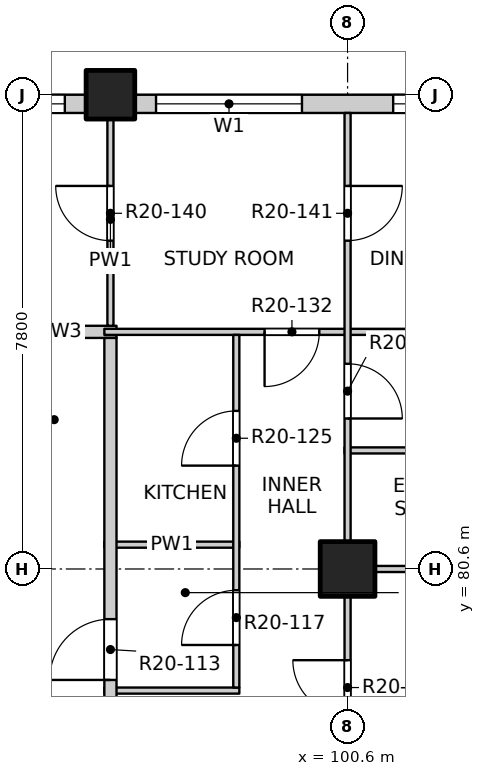
"""IFC4 building model, lengths in metres.
Left out: names, types, materials, properties, quantities, classifications, styles, units other than length and angle.
Written with IfcOpenShell. Run it as: python <this file> out.ifc"""

import sys

from ifc_helpers import new_model, si_unit, direction, frame, frame_2d, origin, origin_2d, place, context, subcontext, project, spatial, rectangle, extrude, element, fill, save


model = new_model("IFC4")
c1 = context("Model", 3, precision=1e-05, world=origin(), true_north=direction((0.0, 1.0)))
c2 = subcontext(c1, "Body", "Model", "MODEL_VIEW")
j1 = project(units=[si_unit("LENGTHUNIT", "METRE"), si_unit("PLANEANGLEUNIT", "RADIAN")], contexts=[c1])
p1 = place(None, origin())
s1 = spatial("IfcSite", under=j1, at=p1, CompositionType="ELEMENT")
p2 = place(p1, origin())
s2 = spatial("IfcBuilding", under=s1, at=p2, CompositionType="ELEMENT")
p3 = place(p2, frame((0.0, 0.0, 204.1)))
s3 = spatial("IfcBuildingStorey", under=s2, at=p3, CompositionType="ELEMENT", Elevation=204.1)
p4 = place(p3, frame((96.7, 88.4, -0.25), z_axis=(0.0, 0.0, 1.0), x_axis=(1.0, 0.0, 0.0)))
e1 = element("IfcColumn", 1, at=p4, inside=s3, PredefinedType="COLUMN", context=c2, shape_type="SweptSolid", body=[
    extrude(rectangle(XDim=0.8, YDim=0.8, at=origin_2d()), origin(), (0.0, 0.0, 1.0), 3.4),
])
p5 = place(p3, frame((100.6, 80.6, -0.25), z_axis=(0.0, 0.0, 1.0), x_axis=(1.0, 0.0, 0.0)))
e2 = element("IfcColumn", 2, at=p5, inside=s3, PredefinedType="COLUMN", context=c2, shape_type="SweptSolid", body=[
    extrude(rectangle(XDim=0.9, YDim=0.9, at=origin_2d()), origin(), (0.0, 0.0, 1.0), 3.4),
])
p6 = place(p3, frame((73.7, 88.25, 0.0), z_axis=(0.0, 0.0, 1.0), x_axis=(1.0, 0.0, 0.0)))
e3 = element("IfcWall", 3, at=p6, inside=s3, PredefinedType="SOLIDWALL", context=c2, shape_type="SweptSolid", body=[
    extrude(rectangle(XDim=22.6, YDim=0.3, at=frame_2d((11.3, 0.0))), origin(), (0.0, 0.0, 1.0), 2.7),
])
p7 = place(p6, frame((0.35, 0.0, 0.9)))
e4 = element("IfcOpeningElement", 4, at=p7, cuts=e3, PredefinedType="OPENING", context=c2, shape_type="SweptSolid", body=[
    extrude(rectangle(XDim=2.4, YDim=1.8, at=frame_2d((1.2, 0.9))), frame((0.0, 0.16, 0.0), z_axis=(0.0, -1.0, 0.0), x_axis=(1.0, 0.0, 0.0)), (0.0, 0.0, 1.0), 0.32),
])
p8 = place(p6, frame((4.25, 0.0, 0.9)))
e5 = element("IfcOpeningElement", 5, at=p8, cuts=e3, PredefinedType="OPENING", context=c2, shape_type="SweptSolid", body=[
    extrude(rectangle(XDim=2.4, YDim=1.8, at=frame_2d((1.2, 0.9))), frame((0.0, 0.16, 0.0), z_axis=(0.0, -1.0, 0.0), x_axis=(1.0, 0.0, 0.0)), (0.0, 0.0, 1.0), 0.32),
])
p9 = place(p6, frame((8.15, 0.0, 0.9)))
e6 = element("IfcOpeningElement", 6, at=p9, cuts=e3, PredefinedType="OPENING", context=c2, shape_type="SweptSolid", body=[
    extrude(rectangle(XDim=2.4, YDim=1.8, at=frame_2d((1.2, 0.9))), frame((0.0, 0.16, 0.0), z_axis=(0.0, -1.0, 0.0), x_axis=(1.0, 0.0, 0.0)), (0.0, 0.0, 1.0), 0.32),
])
p10 = place(p6, frame((12.05, 0.0, 0.9)))
e7 = element("IfcOpeningElement", 7, at=p10, cuts=e3, PredefinedType="OPENING", context=c2, shape_type="SweptSolid", body=[
    extrude(rectangle(XDim=2.4, YDim=1.8, at=frame_2d((1.2, 0.9))), frame((0.0, 0.16, 0.0), z_axis=(0.0, -1.0, 0.0), x_axis=(1.0, 0.0, 0.0)), (0.0, 0.0, 1.0), 0.32),
])
p11 = place(p6, frame((15.95, 0.0, 0.9)))
e8 = element("IfcOpeningElement", 8, at=p11, cuts=e3, PredefinedType="OPENING", context=c2, shape_type="SweptSolid", body=[
    extrude(rectangle(XDim=2.4, YDim=1.8, at=frame_2d((1.2, 0.9))), frame((0.0, 0.16, 0.0), z_axis=(0.0, -1.0, 0.0), x_axis=(1.0, 0.0, 0.0)), (0.0, 0.0, 1.0), 0.32),
])
p12 = place(p6, frame((19.85, 0.0, 0.9)))
e9 = element("IfcOpeningElement", 9, at=p12, cuts=e3, PredefinedType="OPENING", context=c2, shape_type="SweptSolid", body=[
    extrude(rectangle(XDim=2.4, YDim=1.8, at=frame_2d((1.2, 0.9))), frame((0.0, 0.16, 0.0), z_axis=(0.0, -1.0, 0.0), x_axis=(1.0, 0.0, 0.0)), (0.0, 0.0, 1.0), 0.32),
])
p13 = place(p3, frame((97.1, 88.25, 0.0), z_axis=(0.0, 0.0, 1.0), x_axis=(1.0, 0.0, 0.0)))
e10 = element("IfcWall", 10, at=p13, inside=s3, PredefinedType="SOLIDWALL", context=c2, shape_type="SweptSolid", body=[
    extrude(rectangle(XDim=7.4, YDim=0.3, at=frame_2d((3.7, 0.0))), origin(), (0.0, 0.0, 1.0), 2.7),
])
p14 = place(p13, frame((0.35, 0.0, 0.9)))
e11 = element("IfcOpeningElement", 11, at=p14, cuts=e10, PredefinedType="OPENING", context=c2, shape_type="SweptSolid", body=[
    extrude(rectangle(XDim=2.4, YDim=1.8, at=frame_2d((1.2, 0.9))), frame((0.0, 0.16, 0.0), z_axis=(0.0, -1.0, 0.0), x_axis=(1.0, 0.0, 0.0)), (0.0, 0.0, 1.0), 0.32),
])
p15 = place(p13, frame((4.25, 0.0, 0.9)))
e12 = element("IfcOpeningElement", 12, at=p15, cuts=e10, PredefinedType="OPENING", context=c2, shape_type="SweptSolid", body=[
    extrude(rectangle(XDim=2.4, YDim=1.8, at=frame_2d((1.2, 0.9))), frame((0.0, 0.16, 0.0), z_axis=(0.0, -1.0, 0.0), x_axis=(1.0, 0.0, 0.0)), (0.0, 0.0, 1.0), 0.32),
])
p16 = place(p3, frame((96.6, 78.6, 0.0), z_axis=(0.0, 0.0, 1.0), x_axis=(1.0, 0.0, 0.0)))
e13 = element("IfcWall", 13, at=p16, inside=s3, PredefinedType="PARTITIONING", context=c2, shape_type="SweptSolid", body=[
    extrude(rectangle(XDim=2.22, YDim=0.1, at=frame_2d((1.11, 0.0))), origin(), (0.0, 0.0, 1.0), 3.15),
])
p17 = place(p3, frame((100.55, 80.6, 0.0), z_axis=(0.0, 0.0, 1.0), x_axis=(1.0, 0.0, 0.0)))
e14 = element("IfcWall", 14, at=p17, inside=s3, PredefinedType="PARTITIONING", context=c2, shape_type="SweptSolid", body=[
    extrude(rectangle(XDim=7.55, YDim=0.1, at=frame_2d((3.775, 0.0))), origin(), (0.0, 0.0, 1.0), 3.15),
])
p18 = place(p3, frame((96.6, 81.0, 0.0), z_axis=(0.0, 0.0, 1.0), x_axis=(1.0, 0.0, 0.0)))
e15 = element("IfcWall", 15, at=p18, inside=s3, PredefinedType="PARTITIONING", context=c2, shape_type="SweptSolid", body=[
    extrude(rectangle(XDim=2.22, YDim=0.1, at=frame_2d((1.11, 0.0))), origin(), (0.0, 0.0, 1.0), 3.15),
])
p19 = place(p3, frame((100.55, 82.55, 0.0), z_axis=(0.0, 0.0, 1.0), x_axis=(1.0, 0.0, 0.0)))
e16 = element("IfcWall", 16, at=p19, inside=s3, PredefinedType="PARTITIONING", context=c2, shape_type="SweptSolid", body=[
    extrude(rectangle(XDim=3.7, YDim=0.1, at=frame_2d((1.85, 0.0))), origin(), (0.0, 0.0, 1.0), 3.15),
])
p20 = place(p3, frame((94.95, 84.5, 0.0), z_axis=(0.0, 0.0, 1.0), x_axis=(1.0, 0.0, 0.0)))
e17 = element("IfcWall", 17, at=p20, inside=s3, PredefinedType="PARTITIONING", context=c2, shape_type="SweptSolid", body=[
    extrude(rectangle(XDim=1.85, YDim=0.2, at=frame_2d((0.925, 0.0))), origin(), (0.0, 0.0, 1.0), 3.15),
])
p21 = place(p3, frame((96.6, 84.5, 0.0), z_axis=(0.0, 0.0, 1.0), x_axis=(1.0, 0.0, 0.0)))
e18 = element("IfcWall", 18, at=p21, inside=s3, PredefinedType="PARTITIONING", context=c2, shape_type="SweptSolid", body=[
    extrude(rectangle(XDim=11.5, YDim=0.1, at=frame_2d((5.75, 0.0))), origin(), (0.0, 0.0, 1.0), 3.15),
])
p22 = place(p21, frame((2.635, 0.0, 0.0)))
e19 = element("IfcOpeningElement", 19, at=p22, cuts=e18, PredefinedType="OPENING", context=c2, shape_type="SweptSolid", body=[
    extrude(rectangle(XDim=0.9, YDim=2.1, at=frame_2d((0.45, 1.05))), frame((0.0, 0.06, 0.0), z_axis=(0.0, -1.0, 0.0), x_axis=(1.0, 0.0, 0.0)), (0.0, 0.0, 1.0), 0.12),
])
p23 = place(p3, frame((96.7, 49.5, 0.0), z_axis=(0.0, 0.0, 1.0), x_axis=(0.0, 1.0, 0.0)))
e20 = element("IfcWall", 20, at=p23, inside=s3, PredefinedType="PARTITIONING", context=c2, shape_type="SweptSolid", body=[
    extrude(rectangle(XDim=34.9, YDim=0.2, at=frame_2d((17.45, 0.0))), origin(), (0.0, 0.0, 1.0), 3.15),
])
p24 = place(p23, frame((9.625, 0.0, 0.0)))
e21 = element("IfcOpeningElement", 21, at=p24, cuts=e20, PredefinedType="OPENING", context=c2, shape_type="SweptSolid", body=[
    extrude(rectangle(XDim=1.0, YDim=2.1, at=frame_2d((0.5, 1.05))), frame((0.0, 0.11, 0.0), z_axis=(0.0, -1.0, 0.0), x_axis=(1.0, 0.0, 0.0)), (0.0, 0.0, 1.0), 0.22),
])
p25 = place(p23, frame((14.125, 0.0, 0.0)))
e22 = element("IfcOpeningElement", 22, at=p25, cuts=e20, PredefinedType="OPENING", context=c2, shape_type="SweptSolid", body=[
    extrude(rectangle(XDim=1.0, YDim=2.1, at=frame_2d((0.5, 1.05))), frame((0.0, 0.11, 0.0), z_axis=(0.0, -1.0, 0.0), x_axis=(1.0, 0.0, 0.0)), (0.0, 0.0, 1.0), 0.22),
])
p26 = place(p23, frame((29.275, 0.0, 0.0)))
e23 = element("IfcOpeningElement", 23, at=p26, cuts=e20, PredefinedType="OPENING", context=c2, shape_type="SweptSolid", body=[
    extrude(rectangle(XDim=1.0, YDim=2.1, at=frame_2d((0.5, 1.05))), frame((0.0, 0.11, 0.0), z_axis=(0.0, -1.0, 0.0), x_axis=(1.0, 0.0, 0.0)), (0.0, 0.0, 1.0), 0.22),
])
p27 = place(p3, frame((96.7, 84.6, 0.0), z_axis=(0.0, 0.0, 1.0), x_axis=(0.0, 1.0, 0.0)))
e24 = element("IfcWall", 24, at=p27, inside=s3, PredefinedType="PARTITIONING", context=c2, shape_type="SweptSolid", body=[
    extrude(rectangle(XDim=3.5, YDim=0.1, at=frame_2d((1.75, 0.0))), origin(), (0.0, 0.0, 1.0), 3.15),
])
p28 = place(p27, frame((1.4, 0.0, 0.0)))
e25 = element("IfcOpeningElement", 25, at=p28, cuts=e24, PredefinedType="OPENING", context=c2, shape_type="SweptSolid", body=[
    extrude(rectangle(XDim=0.9, YDim=2.1, at=frame_2d((0.45, 1.05))), frame((0.0, 0.06, 0.0), z_axis=(0.0, -1.0, 0.0), x_axis=(1.0, 0.0, 0.0)), (0.0, 0.0, 1.0), 0.12),
])
p29 = place(p3, frame((98.77, 78.65, 0.0), z_axis=(0.0, 0.0, 1.0), x_axis=(0.0, 1.0, 0.0)))
e26 = element("IfcWall", 26, at=p29, inside=s3, PredefinedType="PARTITIONING", context=c2, shape_type="SweptSolid", body=[
    extrude(rectangle(XDim=5.8, YDim=0.1, at=frame_2d((2.9, 0.0))), origin(), (0.0, 0.0, 1.0), 3.15),
])
p30 = place(p29, frame((0.7, 0.0, 0.0)))
e27 = element("IfcOpeningElement", 27, at=p30, cuts=e26, PredefinedType="OPENING", context=c2, shape_type="SweptSolid", body=[
    extrude(rectangle(XDim=0.9, YDim=2.1, at=frame_2d((0.45, 1.05))), frame((0.0, 0.06, 0.0), z_axis=(0.0, -1.0, 0.0), x_axis=(1.0, 0.0, 0.0)), (0.0, 0.0, 1.0), 0.12),
])
p31 = place(p29, frame((3.65, 0.0, 0.0)))
e28 = element("IfcOpeningElement", 28, at=p31, cuts=e26, PredefinedType="OPENING", context=c2, shape_type="SweptSolid", body=[
    extrude(rectangle(XDim=0.9, YDim=2.1, at=frame_2d((0.45, 1.05))), frame((0.0, 0.06, 0.0), z_axis=(0.0, -1.0, 0.0), x_axis=(1.0, 0.0, 0.0)), (0.0, 0.0, 1.0), 0.12),
])
p32 = place(p3, frame((100.6, 41.9, 0.0), z_axis=(0.0, 0.0, 1.0), x_axis=(0.0, 1.0, 0.0)))
e29 = element("IfcWall", 29, at=p32, inside=s3, PredefinedType="PARTITIONING", context=c2, shape_type="SweptSolid", body=[
    extrude(rectangle(XDim=46.2, YDim=0.1, at=frame_2d((23.1, 0.0))), origin(), (0.0, 0.0, 1.0), 3.15),
])
p33 = place(p32, frame((1.2, 0.0, 0.0)))
e30 = element("IfcOpeningElement", 30, at=p33, cuts=e29, PredefinedType="OPENING", context=c2, shape_type="SweptSolid", body=[
    extrude(rectangle(XDim=0.9, YDim=2.1, at=frame_2d((0.45, 1.05))), frame((0.0, 0.06, 0.0), z_axis=(0.0, -1.0, 0.0), x_axis=(1.0, 0.0, 0.0)), (0.0, 0.0, 1.0), 0.12),
])
p34 = place(p32, frame((6.025, 0.0, 0.0)))
e31 = element("IfcOpeningElement", 31, at=p34, cuts=e29, PredefinedType="OPENING", context=c2, shape_type="SweptSolid", body=[
    extrude(rectangle(XDim=0.9, YDim=2.1, at=frame_2d((0.45, 1.05))), frame((0.0, 0.06, 0.0), z_axis=(0.0, -1.0, 0.0), x_axis=(1.0, 0.0, 0.0)), (0.0, 0.0, 1.0), 0.12),
])
p35 = place(p32, frame((9.0, 0.0, 0.0)))
e32 = element("IfcOpeningElement", 32, at=p35, cuts=e29, PredefinedType="OPENING", context=c2, shape_type="SweptSolid", body=[
    extrude(rectangle(XDim=0.9, YDim=2.1, at=frame_2d((0.45, 1.05))), frame((0.0, 0.06, 0.0), z_axis=(0.0, -1.0, 0.0), x_axis=(1.0, 0.0, 0.0)), (0.0, 0.0, 1.0), 0.12),
])
p36 = place(p32, frame((13.85, 0.0, 0.0)))
e33 = element("IfcOpeningElement", 33, at=p36, cuts=e29, PredefinedType="OPENING", context=c2, shape_type="SweptSolid", body=[
    extrude(rectangle(XDim=0.9, YDim=2.1, at=frame_2d((0.45, 1.05))), frame((0.0, 0.06, 0.0), z_axis=(0.0, -1.0, 0.0), x_axis=(1.0, 0.0, 0.0)), (0.0, 0.0, 1.0), 0.12),
])
p37 = place(p32, frame((17.775, 0.0, 0.0)))
e34 = element("IfcOpeningElement", 34, at=p37, cuts=e29, PredefinedType="OPENING", context=c2, shape_type="SweptSolid", body=[
    extrude(rectangle(XDim=0.9, YDim=2.1, at=frame_2d((0.45, 1.05))), frame((0.0, 0.06, 0.0), z_axis=(0.0, -1.0, 0.0), x_axis=(1.0, 0.0, 0.0)), (0.0, 0.0, 1.0), 0.12),
])
p38 = place(p32, frame((20.7, 0.0, 0.0)))
e35 = element("IfcOpeningElement", 35, at=p38, cuts=e29, PredefinedType="OPENING", context=c2, shape_type="SweptSolid", body=[
    extrude(rectangle(XDim=0.9, YDim=2.1, at=frame_2d((0.45, 1.05))), frame((0.0, 0.06, 0.0), z_axis=(0.0, -1.0, 0.0), x_axis=(1.0, 0.0, 0.0)), (0.0, 0.0, 1.0), 0.12),
])
p39 = place(p32, frame((24.6, 0.0, 0.0)))
e36 = element("IfcOpeningElement", 36, at=p39, cuts=e29, PredefinedType="OPENING", context=c2, shape_type="SweptSolid", body=[
    extrude(rectangle(XDim=0.9, YDim=2.1, at=frame_2d((0.45, 1.05))), frame((0.0, 0.06, 0.0), z_axis=(0.0, -1.0, 0.0), x_axis=(1.0, 0.0, 0.0)), (0.0, 0.0, 1.0), 0.12),
])
p40 = place(p32, frame((29.425, 0.0, 0.0)))
e37 = element("IfcOpeningElement", 37, at=p40, cuts=e29, PredefinedType="OPENING", context=c2, shape_type="SweptSolid", body=[
    extrude(rectangle(XDim=0.9, YDim=2.1, at=frame_2d((0.45, 1.05))), frame((0.0, 0.06, 0.0), z_axis=(0.0, -1.0, 0.0), x_axis=(1.0, 0.0, 0.0)), (0.0, 0.0, 1.0), 0.12),
])
p41 = place(p32, frame((33.375, 0.0, 0.0)))
e38 = element("IfcOpeningElement", 38, at=p41, cuts=e29, PredefinedType="OPENING", context=c2, shape_type="SweptSolid", body=[
    extrude(rectangle(XDim=0.9, YDim=2.1, at=frame_2d((0.45, 1.05))), frame((0.0, 0.06, 0.0), z_axis=(0.0, -1.0, 0.0), x_axis=(1.0, 0.0, 0.0)), (0.0, 0.0, 1.0), 0.12),
])
p42 = place(p32, frame((36.3, 0.0, 0.0)))
e39 = element("IfcOpeningElement", 39, at=p42, cuts=e29, PredefinedType="OPENING", context=c2, shape_type="SweptSolid", body=[
    extrude(rectangle(XDim=0.9, YDim=2.1, at=frame_2d((0.45, 1.05))), frame((0.0, 0.06, 0.0), z_axis=(0.0, -1.0, 0.0), x_axis=(1.0, 0.0, 0.0)), (0.0, 0.0, 1.0), 0.12),
])
p43 = place(p32, frame((41.175, 0.0, 0.0)))
e40 = element("IfcOpeningElement", 40, at=p43, cuts=e29, PredefinedType="OPENING", context=c2, shape_type="SweptSolid", body=[
    extrude(rectangle(XDim=0.9, YDim=2.1, at=frame_2d((0.45, 1.05))), frame((0.0, 0.06, 0.0), z_axis=(0.0, -1.0, 0.0), x_axis=(1.0, 0.0, 0.0)), (0.0, 0.0, 1.0), 0.12),
])
p44 = place(p32, frame((44.1, 0.0, 0.0)))
e41 = element("IfcOpeningElement", 41, at=p44, cuts=e29, PredefinedType="OPENING", context=c2, shape_type="SweptSolid", body=[
    extrude(rectangle(XDim=0.9, YDim=2.1, at=frame_2d((0.45, 1.05))), frame((0.0, 0.06, 0.0), z_axis=(0.0, -1.0, 0.0), x_axis=(1.0, 0.0, 0.0)), (0.0, 0.0, 1.0), 0.12),
])
p45 = place(p12, origin())
e42 = element("IfcWindow", 42, at=p45, inside=s3, PartitioningType="DOUBLE_PANEL_VERTICAL", PredefinedType="WINDOW", context=c2, shape_type="SweptSolid", body=[
    extrude(rectangle(XDim=2.4, YDim=1.8, at=frame_2d((1.2, 0.9))), frame((0.0, 0.03, 0.0), z_axis=(0.0, -1.0, 0.0), x_axis=(1.0, 0.0, 0.0)), (0.0, 0.0, 1.0), 0.06),
])
fill(e9, e42)
p46 = place(p14, origin())
e43 = element("IfcWindow", 43, at=p46, inside=s3, PartitioningType="DOUBLE_PANEL_VERTICAL", PredefinedType="WINDOW", context=c2, shape_type="SweptSolid", body=[
    extrude(rectangle(XDim=2.4, YDim=1.8, at=frame_2d((1.2, 0.9))), frame((0.0, 0.03, 0.0), z_axis=(0.0, -1.0, 0.0), x_axis=(1.0, 0.0, 0.0)), (0.0, 0.0, 1.0), 0.06),
])
fill(e11, e43)
p47 = place(p15, origin())
e44 = element("IfcWindow", 44, at=p47, inside=s3, PartitioningType="DOUBLE_PANEL_VERTICAL", PredefinedType="WINDOW", context=c2, shape_type="SweptSolid", body=[
    extrude(rectangle(XDim=2.4, YDim=1.8, at=frame_2d((1.2, 0.9))), frame((0.0, 0.03, 0.0), z_axis=(0.0, -1.0, 0.0), x_axis=(1.0, 0.0, 0.0)), (0.0, 0.0, 1.0), 0.06),
])
fill(e12, e44)
p48 = place(p42, origin())
e45 = element("IfcDoor", 45, at=p48, inside=s3, OperationType="SINGLE_SWING_RIGHT", PredefinedType="DOOR", context=c2, shape_type="SweptSolid", body=[
    extrude(rectangle(XDim=0.9, YDim=2.1, at=frame_2d((0.45, 1.05))), frame((0.0, 0.025, 0.0), z_axis=(0.0, -1.0, 0.0), x_axis=(1.0, 0.0, 0.0)), (0.0, 0.0, 1.0), 0.05),
])
fill(e39, e45)
p49 = place(p26, origin())
e46 = element("IfcDoor", 46, at=p49, inside=s3, OperationType="SINGLE_SWING_LEFT", PredefinedType="DOOR", context=c2, shape_type="SweptSolid", body=[
    extrude(rectangle(XDim=1.0, YDim=2.1, at=frame_2d((0.5, 1.05))), frame((0.0, 0.025, 0.0), z_axis=(0.0, -1.0, 0.0), x_axis=(1.0, 0.0, 0.0)), (0.0, 0.0, 1.0), 0.05),
])
fill(e23, e46)
p50 = place(p30, origin())
e47 = element("IfcDoor", 47, at=p50, inside=s3, OperationType="SINGLE_SWING_LEFT", PredefinedType="DOOR", context=c2, shape_type="SweptSolid", body=[
    extrude(rectangle(XDim=0.9, YDim=2.1, at=frame_2d((0.45, 1.05))), frame((0.0, 0.025, 0.0), z_axis=(0.0, -1.0, 0.0), x_axis=(1.0, 0.0, 0.0)), (0.0, 0.0, 1.0), 0.05),
])
fill(e27, e47)
p51 = place(p31, origin())
e48 = element("IfcDoor", 48, at=p51, inside=s3, OperationType="SINGLE_SWING_LEFT", PredefinedType="DOOR", context=c2, shape_type="SweptSolid", body=[
    extrude(rectangle(XDim=0.9, YDim=2.1, at=frame_2d((0.45, 1.05))), frame((0.0, 0.025, 0.0), z_axis=(0.0, -1.0, 0.0), x_axis=(1.0, 0.0, 0.0)), (0.0, 0.0, 1.0), 0.05),
])
fill(e28, e48)
p52 = place(p43, origin())
e49 = element("IfcDoor", 49, at=p52, inside=s3, OperationType="SINGLE_SWING_RIGHT", PredefinedType="DOOR", context=c2, shape_type="SweptSolid", body=[
    extrude(rectangle(XDim=0.9, YDim=2.1, at=frame_2d((0.45, 1.05))), frame((0.0, 0.025, 0.0), z_axis=(0.0, -1.0, 0.0), x_axis=(1.0, 0.0, 0.0)), (0.0, 0.0, 1.0), 0.05),
])
fill(e40, e49)
p53 = place(p22, origin())
e50 = element("IfcDoor", 50, at=p53, inside=s3, OperationType="SINGLE_SWING_RIGHT", PredefinedType="DOOR", context=c2, shape_type="SweptSolid", body=[
    extrude(rectangle(XDim=0.9, YDim=2.1, at=frame_2d((0.45, 1.05))), frame((0.0, 0.025, 0.0), z_axis=(0.0, -1.0, 0.0), x_axis=(1.0, 0.0, 0.0)), (0.0, 0.0, 1.0), 0.05),
])
fill(e19, e50)
p54 = place(p28, origin())
e51 = element("IfcDoor", 51, at=p54, inside=s3, OperationType="SINGLE_SWING_RIGHT", PredefinedType="DOOR", context=c2, shape_type="SweptSolid", body=[
    extrude(rectangle(XDim=0.9, YDim=2.1, at=frame_2d((0.45, 1.05))), frame((0.0, 0.025, 0.0), z_axis=(0.0, -1.0, 0.0), x_axis=(1.0, 0.0, 0.0)), (0.0, 0.0, 1.0), 0.05),
])
fill(e25, e51)
p55 = place(p44, origin())
e52 = element("IfcDoor", 52, at=p55, inside=s3, OperationType="SINGLE_SWING_LEFT", PredefinedType="DOOR", context=c2, shape_type="SweptSolid", body=[
    extrude(rectangle(XDim=0.9, YDim=2.1, at=frame_2d((0.45, 1.05))), frame((0.0, 0.025, 0.0), z_axis=(0.0, -1.0, 0.0), x_axis=(1.0, 0.0, 0.0)), (0.0, 0.0, 1.0), 0.05),
])
fill(e41, e52)
save(model, sys.argv[1])
